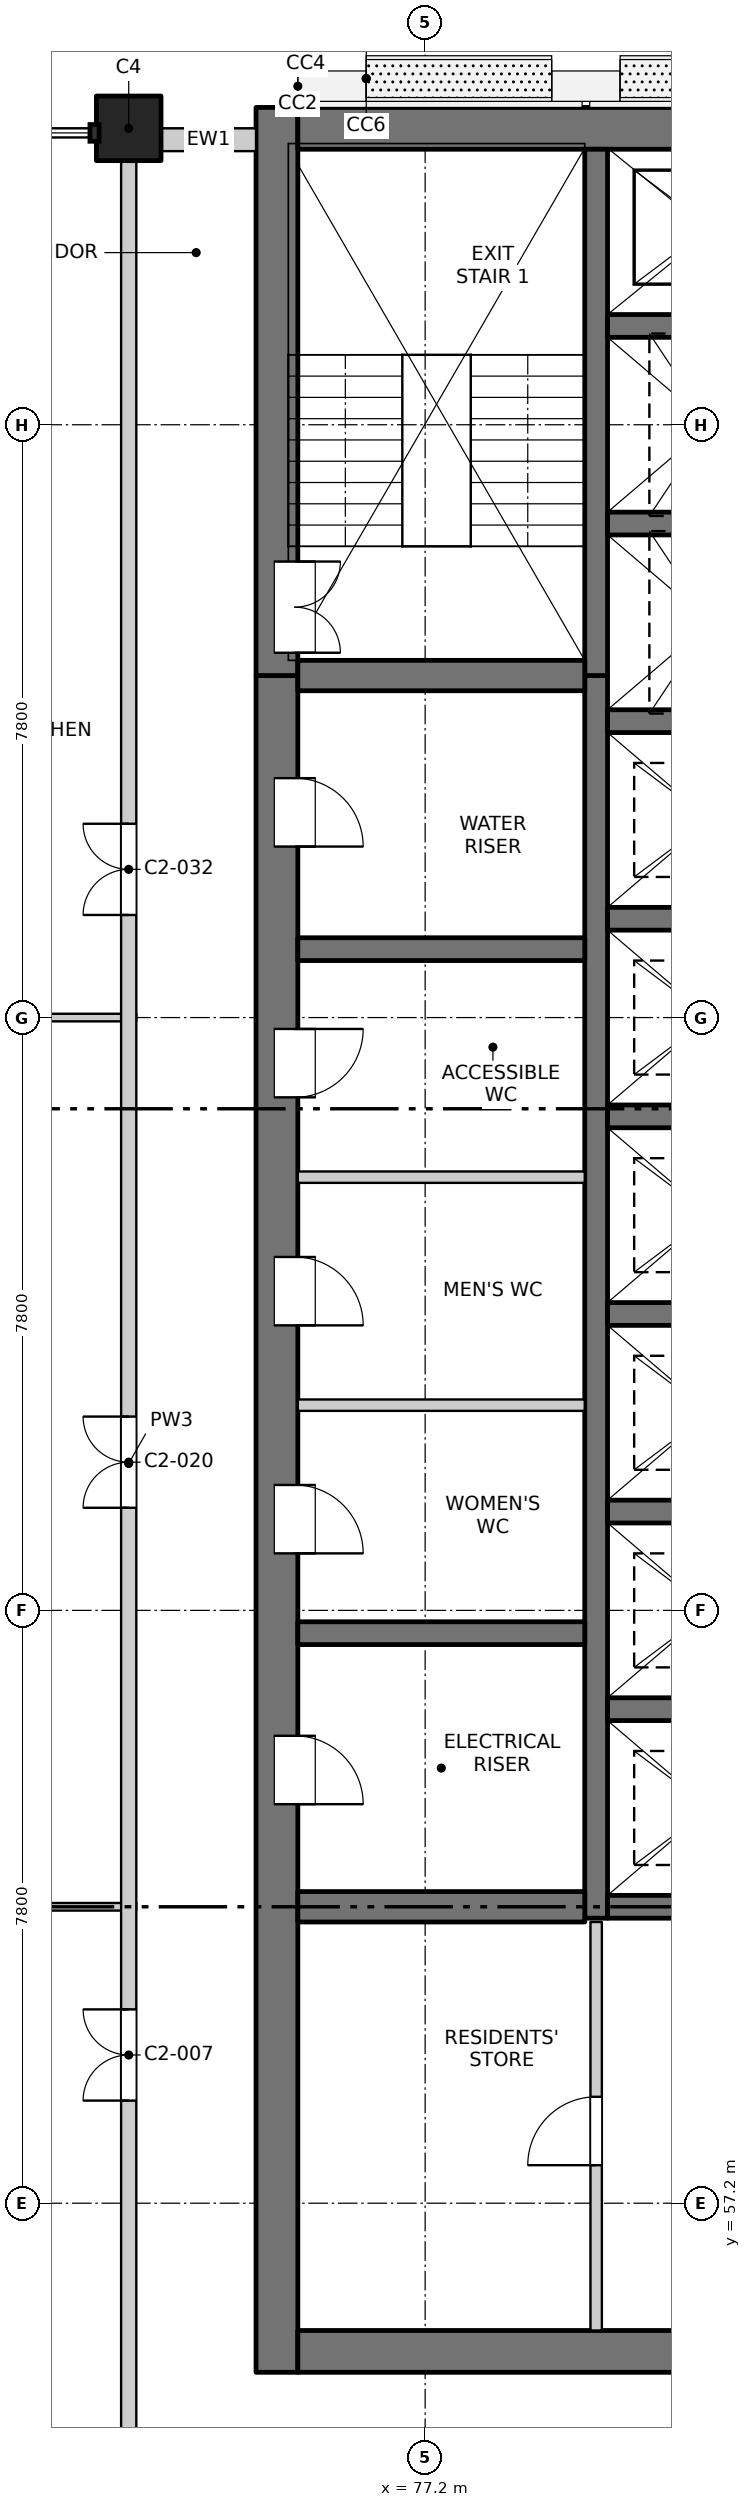
"""IFC4 building model, lengths in metres.
Left out: names, types, materials, properties, quantities, classifications, styles, units other than length and angle.
Written with IfcOpenShell. Run it as: python <this file> out.ifc"""

import sys

from ifc_helpers import new_model, si_unit, direction, frame, frame_2d, origin, origin_2d, place, context, subcontext, project, spatial, rectangle, extrude, element, fill, save


model = new_model("IFC4")
c1 = context("Model", 3, precision=1e-05, world=origin(), true_north=direction((0.0, 1.0)))
c2 = subcontext(c1, "Body", "Model", "MODEL_VIEW")
j1 = project(units=[si_unit("LENGTHUNIT", "METRE"), si_unit("PLANEANGLEUNIT", "RADIAN")], contexts=[c1])
p1 = place(None, origin())
s1 = spatial("IfcSite", under=j1, at=p1, CompositionType="ELEMENT")
p2 = place(p1, origin())
s2 = spatial("IfcBuilding", under=s1, at=p2, CompositionType="ELEMENT")
p3 = place(p2, frame((0.0, 0.0, 133.9)))
s3 = spatial("IfcBuildingStorey", under=s2, at=p3, CompositionType="ELEMENT", Elevation=133.9)
p4 = place(p3, frame((73.3, 84.5, -0.25), z_axis=(0.0, 0.0, 1.0), x_axis=(1.0, 0.0, 0.0)))
e1 = element("IfcColumn", 1, at=p4, inside=s3, PredefinedType="COLUMN", context=c2, shape_type="SweptSolid", body=[
    extrude(rectangle(XDim=0.85, YDim=0.85, at=origin_2d()), origin(), (0.0, 0.0, 1.0), 3.4),
])
p5 = place(p3, frame((75.25, 54.975, -0.25), z_axis=(0.0, 0.0, 1.0), x_axis=(0.0, 1.0, 0.0)))
e2 = element("IfcWall", 2, at=p5, inside=s3, PredefinedType="SOLIDWALL", context=c2, shape_type="SweptSolid", body=[
    extrude(rectangle(XDim=22.325, YDim=0.55, at=frame_2d((11.163, 0.0))), origin(), (0.0, 0.0, 1.0), 3.4),
])
p6 = place(p5, frame((7.475, 0.0, 0.25)))
e3 = element("IfcOpeningElement", 3, at=p6, cuts=e2, PredefinedType="OPENING", context=c2, shape_type="SweptSolid", body=[
    extrude(rectangle(XDim=0.9, YDim=2.1, at=frame_2d((0.45, 1.05))), frame((0.0, 0.285, 0.0), z_axis=(0.0, -1.0, 0.0), x_axis=(1.0, 0.0, 0.0)), (0.0, 0.0, 1.0), 0.57),
])
p7 = place(p5, frame((10.775, 0.0, 0.25)))
e4 = element("IfcOpeningElement", 4, at=p7, cuts=e2, PredefinedType="OPENING", context=c2, shape_type="SweptSolid", body=[
    extrude(rectangle(XDim=0.9, YDim=2.1, at=frame_2d((0.45, 1.05))), frame((0.0, 0.285, 0.0), z_axis=(0.0, -1.0, 0.0), x_axis=(1.0, 0.0, 0.0)), (0.0, 0.0, 1.0), 0.57),
])
p8 = place(p5, frame((13.775, 0.0, 0.25)))
e5 = element("IfcOpeningElement", 5, at=p8, cuts=e2, PredefinedType="OPENING", context=c2, shape_type="SweptSolid", body=[
    extrude(rectangle(XDim=0.9, YDim=2.1, at=frame_2d((0.45, 1.05))), frame((0.0, 0.285, 0.0), z_axis=(0.0, -1.0, 0.0), x_axis=(1.0, 0.0, 0.0)), (0.0, 0.0, 1.0), 0.57),
])
p9 = place(p5, frame((16.775, 0.0, 0.25)))
e6 = element("IfcOpeningElement", 6, at=p9, cuts=e2, PredefinedType="OPENING", context=c2, shape_type="SweptSolid", body=[
    extrude(rectangle(XDim=0.9, YDim=2.1, at=frame_2d((0.45, 1.05))), frame((0.0, 0.285, 0.0), z_axis=(0.0, -1.0, 0.0), x_axis=(1.0, 0.0, 0.0)), (0.0, 0.0, 1.0), 0.57),
])
p10 = place(p5, frame((20.075, 0.0, 0.25)))
e7 = element("IfcOpeningElement", 7, at=p10, cuts=e2, PredefinedType="OPENING", context=c2, shape_type="SweptSolid", body=[
    extrude(rectangle(XDim=0.9, YDim=2.1, at=frame_2d((0.45, 1.05))), frame((0.0, 0.285, 0.0), z_axis=(0.0, -1.0, 0.0), x_axis=(1.0, 0.0, 0.0)), (0.0, 0.0, 1.0), 0.57),
])
p11 = place(p3, frame((75.25, 77.3, -0.25), z_axis=(0.0, 0.0, 1.0), x_axis=(0.0, 1.0, 0.0)))
e8 = element("IfcWall", 8, at=p11, inside=s3, PredefinedType="SOLIDWALL", context=c2, shape_type="SweptSolid", body=[
    extrude(rectangle(XDim=7.475, YDim=0.55, at=frame_2d((3.737, 0.0))), origin(), (0.0, 0.0, 1.0), 3.4),
])
p12 = place(p11, frame((0.3, 0.0, 0.25)))
e9 = element("IfcOpeningElement", 9, at=p12, cuts=e8, PredefinedType="OPENING", context=c2, shape_type="SweptSolid", body=[
    extrude(rectangle(XDim=1.2, YDim=2.1, at=frame_2d((0.6, 1.05))), frame((0.0, 0.285, 0.0), z_axis=(0.0, -1.0, 0.0), x_axis=(1.0, 0.0, 0.0)), (0.0, 0.0, 1.0), 0.57),
])
p13 = place(p3, frame((75.525, 55.25, -0.25), z_axis=(0.0, 0.0, 1.0), x_axis=(1.0, 0.0, 0.0)))
e10 = element("IfcWall", 10, at=p13, inside=s3, PredefinedType="SOLIDWALL", context=c2, shape_type="SweptSolid", body=[
    extrude(rectangle(XDim=18.95, YDim=0.55, at=frame_2d((9.475, 0.0))), origin(), (0.0, 0.0, 1.0), 3.4),
])
p14 = place(p13, frame((8.725, 0.0, 0.25)))
e11 = element("IfcOpeningElement", 11, at=p14, cuts=e10, PredefinedType="OPENING", context=c2, shape_type="SweptSolid", body=[
    extrude(rectangle(XDim=1.5, YDim=2.1, at=frame_2d((0.75, 1.05))), frame((0.0, 0.285, 0.0), z_axis=(0.0, -1.0, 0.0), x_axis=(1.0, 0.0, 0.0)), (0.0, 0.0, 1.0), 0.57),
])
p15 = place(p3, frame((75.525, 84.5, -0.25), z_axis=(0.0, 0.0, 1.0), x_axis=(1.0, 0.0, 0.0)))
e12 = element("IfcWall", 12, at=p15, inside=s3, PredefinedType="SOLIDWALL", context=c2, shape_type="SweptSolid", body=[
    extrude(rectangle(XDim=18.95, YDim=0.55, at=frame_2d((9.475, 0.0))), origin(), (0.0, 0.0, 1.0), 3.4),
])
p16 = place(p3, frame((79.45, 60.95, -0.25), z_axis=(0.0, 0.0, 1.0), x_axis=(0.0, 1.0, 0.0)))
e13 = element("IfcWall", 13, at=p16, inside=s3, PredefinedType="SOLIDWALL", context=c2, shape_type="SweptSolid", body=[
    extrude(rectangle(XDim=16.35, YDim=0.3, at=frame_2d((8.175, 0.0))), origin(), (0.0, 0.0, 1.0), 3.4),
])
p17 = place(p3, frame((79.45, 77.3, -0.25), z_axis=(0.0, 0.0, 1.0), x_axis=(0.0, 1.0, 0.0)))
e14 = element("IfcWall", 14, at=p17, inside=s3, PredefinedType="SOLIDWALL", context=c2, shape_type="SweptSolid", body=[
    extrude(rectangle(XDim=6.925, YDim=0.3, at=frame_2d((3.462, 0.0))), origin(), (0.0, 0.0, 1.0), 3.4),
])
for number, where, z_axis, x_axis in (
    (15, (79.6, 61.1, -0.25), (0.0, 0.0, 1.0), (1.0, 0.0, 0.0)),
    (16, (79.6, 63.7, -0.25), (0.0, 0.0, 1.0), (1.0, 0.0, 0.0)),
    (17, (79.6, 66.3, -0.25), (0.0, 0.0, 1.0), (1.0, 0.0, 0.0)),
    (18, (79.6, 68.9, -0.25), (0.0, 0.0, 1.0), (1.0, 0.0, 0.0)),
    (19, (79.6, 71.5, -0.25), (0.0, 0.0, 1.0), (1.0, 0.0, 0.0)),
    (20, (79.6, 74.1, -0.25), (0.0, 0.0, 1.0), (1.0, 0.0, 0.0)),
    (21, (79.6, 76.7, -0.25), (0.0, 0.0, 1.0), (1.0, 0.0, 0.0)),
    (22, (79.6, 79.3, -0.25), (0.0, 0.0, 1.0), (1.0, 0.0, 0.0)),
    (23, (79.6, 81.9, -0.25), (0.0, 0.0, 1.0), (1.0, 0.0, 0.0)),
):
    element("IfcWall", number, at=place(p3, frame(where, z_axis=z_axis, x_axis=x_axis)), inside=s3, PredefinedType="SOLIDWALL", context=c2, shape_type="SweptSolid", body=[
        extrude(rectangle(XDim=3.0, YDim=0.3, at=frame_2d((1.5, 0.0))), origin(), (0.0, 0.0, 1.0), 3.4),
    ])
p18 = place(p3, frame((75.525, 61.1, -0.25), z_axis=(0.0, 0.0, 1.0), x_axis=(1.0, 0.0, 0.0)))
e24 = element("IfcWall", 24, at=p18, inside=s3, PredefinedType="SOLIDWALL", context=c2, shape_type="SweptSolid", body=[
    extrude(rectangle(XDim=3.775, YDim=0.4, at=frame_2d((1.888, 0.0))), origin(), (0.0, 0.0, 1.0), 3.4),
])
for number, where, z_axis, x_axis in (
    (25, (75.525, 64.7, -0.25), (0.0, 0.0, 1.0), (1.0, 0.0, 0.0)),
    (26, (75.525, 73.7, -0.25), (0.0, 0.0, 1.0), (1.0, 0.0, 0.0)),
):
    element("IfcWall", number, at=place(p3, frame(where, z_axis=z_axis, x_axis=x_axis)), inside=s3, PredefinedType="SOLIDWALL", context=c2, shape_type="SweptSolid", body=[
        extrude(rectangle(XDim=3.775, YDim=0.3, at=frame_2d((1.888, 0.0))), origin(), (0.0, 0.0, 1.0), 3.4),
    ])
p19 = place(p3, frame((75.525, 77.3, -0.25), z_axis=(0.0, 0.0, 1.0), x_axis=(1.0, 0.0, 0.0)))
e27 = element("IfcWall", 27, at=p19, inside=s3, PredefinedType="SOLIDWALL", context=c2, shape_type="SweptSolid", body=[
    extrude(rectangle(XDim=3.775, YDim=0.4, at=frame_2d((1.888, 0.0))), origin(), (0.0, 0.0, 1.0), 3.4),
])
p20 = place(p3, frame((73.725, 84.35, 0.0), z_axis=(0.0, 0.0, 1.0), x_axis=(1.0, 0.0, 0.0)))
e28 = element("IfcWall", 28, at=p20, inside=s3, PredefinedType="SOLIDWALL", context=c2, shape_type="SweptSolid", body=[
    extrude(rectangle(XDim=1.25, YDim=0.3, at=frame_2d((0.625, 0.0))), origin(), (0.0, 0.0, 1.0), 2.7),
])
p21 = place(p3, frame((65.635, 61.1, 0.0), z_axis=(0.0, 0.0, 1.0), x_axis=(1.0, 0.0, 0.0)))
e29 = element("IfcWall", 29, at=p21, inside=s3, PredefinedType="PARTITIONING", context=c2, shape_type="SweptSolid", body=[
    extrude(rectangle(XDim=7.765, YDim=0.1, at=frame_2d((3.883, 0.0))), origin(), (0.0, 0.0, 1.0), 2.55),
])
for number, where, z_axis, x_axis in (
    (30, (75.525, 67.7, 0.0), (0.0, 0.0, 1.0), (1.0, 0.0, 0.0)),
    (31, (75.525, 70.7, 0.0), (0.0, 0.0, 1.0), (1.0, 0.0, 0.0)),
):
    element("IfcWall", number, at=place(p3, frame(where, z_axis=z_axis, x_axis=x_axis)), inside=s3, PredefinedType="PARTITIONING", context=c2, shape_type="SweptSolid", body=[
        extrude(rectangle(XDim=3.775, YDim=0.15, at=frame_2d((1.887, 0.0))), origin(), (0.0, 0.0, 1.0), 3.15),
    ])
p22 = place(p3, frame((65.635, 72.8, 0.0), z_axis=(0.0, 0.0, 1.0), x_axis=(1.0, 0.0, 0.0)))
e32 = element("IfcWall", 32, at=p22, inside=s3, PredefinedType="PARTITIONING", context=c2, shape_type="SweptSolid", body=[
    extrude(rectangle(XDim=7.765, YDim=0.1, at=frame_2d((3.883, 0.0))), origin(), (0.0, 0.0, 1.0), 3.15),
])
p23 = place(p3, frame((73.3, 49.5, 0.0), z_axis=(0.0, 0.0, 1.0), x_axis=(0.0, 1.0, 0.0)))
e33 = element("IfcWall", 33, at=p23, inside=s3, PredefinedType="PARTITIONING", context=c2, shape_type="SweptSolid", body=[
    extrude(rectangle(XDim=34.865, YDim=0.2, at=frame_2d((17.433, 0.0))), origin(), (0.0, 0.0, 1.0), 3.15),
])
p24 = place(p23, frame((9.05, 0.0, 0.0)))
e34 = element("IfcOpeningElement", 34, at=p24, cuts=e33, PredefinedType="OPENING", context=c2, shape_type="SweptSolid", body=[
    extrude(rectangle(XDim=1.2, YDim=2.1, at=frame_2d((0.6, 1.05))), frame((0.0, 0.11, 0.0), z_axis=(0.0, -1.0, 0.0), x_axis=(1.0, 0.0, 0.0)), (0.0, 0.0, 1.0), 0.22),
])
p25 = place(p23, frame((16.85, 0.0, 0.0)))
e35 = element("IfcOpeningElement", 35, at=p25, cuts=e33, PredefinedType="OPENING", context=c2, shape_type="SweptSolid", body=[
    extrude(rectangle(XDim=1.2, YDim=2.1, at=frame_2d((0.6, 1.05))), frame((0.0, 0.11, 0.0), z_axis=(0.0, -1.0, 0.0), x_axis=(1.0, 0.0, 0.0)), (0.0, 0.0, 1.0), 0.22),
])
p26 = place(p23, frame((24.65, 0.0, 0.0)))
e36 = element("IfcOpeningElement", 36, at=p26, cuts=e33, PredefinedType="OPENING", context=c2, shape_type="SweptSolid", body=[
    extrude(rectangle(XDim=1.2, YDim=2.1, at=frame_2d((0.6, 1.05))), frame((0.0, 0.11, 0.0), z_axis=(0.0, -1.0, 0.0), x_axis=(1.0, 0.0, 0.0)), (0.0, 0.0, 1.0), 0.22),
])
p27 = place(p3, frame((79.45, 55.525, 0.0), z_axis=(0.0, 0.0, 1.0), x_axis=(0.0, 1.0, 0.0)))
e37 = element("IfcWall", 37, at=p27, inside=s3, PredefinedType="PARTITIONING", context=c2, shape_type="SweptSolid", body=[
    extrude(rectangle(XDim=5.375, YDim=0.15, at=frame_2d((2.688, 0.0))), origin(), (0.0, 0.0, 1.0), 3.15),
])
p28 = place(p27, frame((2.175, 0.0, 0.0)))
e38 = element("IfcOpeningElement", 38, at=p28, cuts=e37, PredefinedType="OPENING", context=c2, shape_type="SweptSolid", body=[
    extrude(rectangle(XDim=0.9, YDim=2.1, at=frame_2d((0.45, 1.05))), frame((0.0, 0.085, 0.0), z_axis=(0.0, -1.0, 0.0), x_axis=(1.0, 0.0, 0.0)), (0.0, 0.0, 1.0), 0.17),
])
p29 = place(p28, origin())
e39 = element("IfcDoor", 39, at=p29, inside=s3, OperationType="SINGLE_SWING_LEFT", PredefinedType="DOOR", context=c2, shape_type="SweptSolid", body=[
    extrude(rectangle(XDim=0.9, YDim=2.1, at=frame_2d((0.45, 1.05))), frame((0.0, 0.025, 0.0), z_axis=(0.0, -1.0, 0.0), x_axis=(1.0, 0.0, 0.0)), (0.0, 0.0, 1.0), 0.05),
])
fill(e38, e39)
p30 = place(p24, origin())
e40 = element("IfcDoor", 40, at=p30, inside=s3, OperationType="DOUBLE_DOOR_SINGLE_SWING", PredefinedType="DOOR", context=c2, shape_type="SweptSolid", body=[
    extrude(rectangle(XDim=1.2, YDim=2.1, at=frame_2d((0.6, 1.05))), frame((0.0, 0.025, 0.0), z_axis=(0.0, -1.0, 0.0), x_axis=(1.0, 0.0, 0.0)), (0.0, 0.0, 1.0), 0.05),
])
fill(e34, e40)
p31 = place(p6, origin())
e41 = element("IfcDoor", 41, at=p31, inside=s3, OperationType="SINGLE_SWING_RIGHT", PredefinedType="DOOR", context=c2, shape_type="SweptSolid", body=[
    extrude(rectangle(XDim=0.9, YDim=2.1, at=frame_2d((0.45, 1.05))), frame((0.0, -0.21, 0.0), z_axis=(0.0, -1.0, 0.0), x_axis=(1.0, 0.0, 0.0)), (0.0, 0.0, 1.0), 0.05),
])
fill(e3, e41)
p32 = place(p7, origin())
e42 = element("IfcDoor", 42, at=p32, inside=s3, OperationType="SINGLE_SWING_RIGHT", PredefinedType="DOOR", context=c2, shape_type="SweptSolid", body=[
    extrude(rectangle(XDim=0.9, YDim=2.1, at=frame_2d((0.45, 1.05))), frame((0.0, -0.21, 0.0), z_axis=(0.0, -1.0, 0.0), x_axis=(1.0, 0.0, 0.0)), (0.0, 0.0, 1.0), 0.05),
])
fill(e4, e42)
p33 = place(p25, origin())
e43 = element("IfcDoor", 43, at=p33, inside=s3, OperationType="DOUBLE_DOOR_SINGLE_SWING", PredefinedType="DOOR", context=c2, shape_type="SweptSolid", body=[
    extrude(rectangle(XDim=1.2, YDim=2.1, at=frame_2d((0.6, 1.05))), frame((0.0, 0.025, 0.0), z_axis=(0.0, -1.0, 0.0), x_axis=(1.0, 0.0, 0.0)), (0.0, 0.0, 1.0), 0.05),
])
fill(e35, e43)
p34 = place(p8, origin())
e44 = element("IfcDoor", 44, at=p34, inside=s3, OperationType="SINGLE_SWING_RIGHT", PredefinedType="DOOR", context=c2, shape_type="SweptSolid", body=[
    extrude(rectangle(XDim=0.9, YDim=2.1, at=frame_2d((0.45, 1.05))), frame((0.0, -0.21, 0.0), z_axis=(0.0, -1.0, 0.0), x_axis=(1.0, 0.0, 0.0)), (0.0, 0.0, 1.0), 0.05),
])
fill(e5, e44)
p35 = place(p9, origin())
e45 = element("IfcDoor", 45, at=p35, inside=s3, OperationType="SINGLE_SWING_LEFT", PredefinedType="DOOR", context=c2, shape_type="SweptSolid", body=[
    extrude(rectangle(XDim=0.9, YDim=2.1, at=frame_2d((0.45, 1.05))), frame((0.0, -0.21, 0.0), z_axis=(0.0, -1.0, 0.0), x_axis=(1.0, 0.0, 0.0)), (0.0, 0.0, 1.0), 0.05),
])
fill(e6, e45)
p36 = place(p26, origin())
e46 = element("IfcDoor", 46, at=p36, inside=s3, OperationType="DOUBLE_DOOR_SINGLE_SWING", PredefinedType="DOOR", context=c2, shape_type="SweptSolid", body=[
    extrude(rectangle(XDim=1.2, YDim=2.1, at=frame_2d((0.6, 1.05))), frame((0.0, 0.025, 0.0), z_axis=(0.0, -1.0, 0.0), x_axis=(1.0, 0.0, 0.0)), (0.0, 0.0, 1.0), 0.05),
])
fill(e36, e46)
p37 = place(p10, origin())
e47 = element("IfcDoor", 47, at=p37, inside=s3, OperationType="SINGLE_SWING_RIGHT", PredefinedType="DOOR", context=c2, shape_type="SweptSolid", body=[
    extrude(rectangle(XDim=0.9, YDim=2.1, at=frame_2d((0.45, 1.05))), frame((0.0, -0.21, 0.0), z_axis=(0.0, -1.0, 0.0), x_axis=(1.0, 0.0, 0.0)), (0.0, 0.0, 1.0), 0.05),
])
fill(e7, e47)
p38 = place(p12, origin())
e48 = element("IfcDoor", 48, at=p38, inside=s3, OperationType="DOUBLE_DOOR_SINGLE_SWING", PredefinedType="DOOR", context=c2, shape_type="SweptSolid", body=[
    extrude(rectangle(XDim=1.2, YDim=2.1, at=frame_2d((0.6, 1.05))), frame((0.0, -0.21, 0.0), z_axis=(0.0, -1.0, 0.0), x_axis=(1.0, 0.0, 0.0)), (0.0, 0.0, 1.0), 0.05),
])
fill(e9, e48)
save(model, sys.argv[1])
